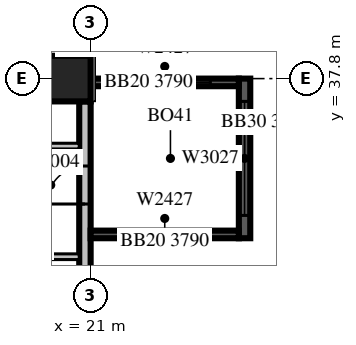
"""IFC4 building model, lengths in metres.
Left out: names, types, materials, properties, quantities, classifications, styles, units other than length and angle.
Written with IfcOpenShell. Run it as: python <this file> out.ifc"""

import sys

from ifc_helpers import new_model, si_unit, direction, frame, frame_2d, origin, origin_2d, place, context, subcontext, project, spatial, rectangle, extrude, source, transform, mapped, element, fill, save


model = new_model("IFC4")
c1 = context("Model", 3, precision=1e-05, world=origin(), true_north=direction((0.0, 1.0)))
c2 = subcontext(c1, "Body", "Model", "MODEL_VIEW")
j1 = project(units=[si_unit("LENGTHUNIT", "METRE"), si_unit("PLANEANGLEUNIT", "RADIAN")], contexts=[c1])
p1 = place(None, origin())
s1 = spatial("IfcSite", under=j1, at=p1, CompositionType="ELEMENT")
p2 = place(p1, origin())
s2 = spatial("IfcBuilding", under=s1, at=p2, CompositionType="ELEMENT")
p3 = place(p2, frame((0.0, 0.0, 65.7)))
s3 = spatial("IfcBuildingStorey", under=s2, at=p3, CompositionType="ELEMENT", Elevation=65.7)
m1 = source(origin(), c2, "Body", "SweptSolid", [
    extrude(rectangle(XDim=1.2, YDim=1.2, at=origin_2d()), origin(), (0.0, 0.0, 1.0), 4.2),
])
p4 = place(p3, frame((20.4, 37.8, 0.0), z_axis=(0.0, 0.0, 1.0), x_axis=(1.0, 0.0, 0.0)))
e1 = element("IfcColumn", 1, at=p4, inside=s3, PredefinedType="COLUMN", context=c2, shape_type="MappedRepresentation", body=[
    mapped(m1, transform((0.0, 0.0, 0.0), scale=1.0)),
])
m2 = source(origin(), c2, "Body", "SweptSolid", [
    extrude(rectangle(XDim=7.2, YDim=0.3, at=frame_2d((3.6, 0.0))), origin(), (0.0, 0.0, 1.0), 3.8),
])
p5 = place(p3, frame((20.85, 30.0, 0.0), z_axis=(0.0, 0.0, 1.0), x_axis=(0.0, 1.0, 0.0)))
e2 = element("IfcWall", 2, at=p5, inside=s3, PredefinedType="STANDARD", context=c2, shape_type="MappedRepresentation", body=[
    mapped(m2, transform((0.0, 0.0, 0.0), scale=1.0)),
])
m3 = source(origin(), c2, "Body", "SweptSolid", [
    extrude(rectangle(XDim=2.4, YDim=2.7, at=frame_2d((1.2, 1.35))), frame((0.0, 0.16, 0.0), z_axis=(0.0, -1.0, 0.0), x_axis=(1.0, 0.0, 0.0)), (0.0, 0.0, 1.0), 0.32),
])
p6 = place(p5, frame((0.3, 0.0, 0.6)))
e3 = element("IfcOpeningElement", 3, at=p6, cuts=e2, PredefinedType="OPENING", context=c2, shape_type="MappedRepresentation", body=[
    mapped(m3, transform((0.0, 0.0, 0.0), scale=1.0)),
])
m4 = source(origin(), c2, "Body", "SweptSolid", [
    extrude(rectangle(XDim=1.0, YDim=2.1, at=frame_2d((0.5, 1.05))), frame((0.0, 0.16, 0.0), z_axis=(0.0, -1.0, 0.0), x_axis=(1.0, 0.0, 0.0)), (0.0, 0.0, 1.0), 0.32),
])
p7 = place(p5, frame((4.5, 0.0, 0.0)))
e4 = element("IfcOpeningElement", 4, at=p7, cuts=e2, PredefinedType="OPENING", context=c2, shape_type="MappedRepresentation", body=[
    mapped(m4, transform((0.0, 0.0, 0.0), scale=1.0)),
])
p8 = place(p3, frame((20.85, 38.4, 0.0), z_axis=(0.0, 0.0, 1.0), x_axis=(0.0, 1.0, 0.0)))
e5 = element("IfcWall", 5, at=p8, inside=s3, PredefinedType="STANDARD", context=c2, shape_type="MappedRepresentation", body=[
    mapped(m2, transform((0.0, 0.0, 0.0), scale=1.0)),
])
p9 = place(p8, frame((0.3, 0.0, 0.6)))
e6 = element("IfcOpeningElement", 6, at=p9, cuts=e5, PredefinedType="OPENING", context=c2, shape_type="MappedRepresentation", body=[
    mapped(m3, transform((0.0, 0.0, 0.0), scale=1.0)),
])
p10 = place(p8, frame((4.5, 0.0, 0.6)))
e7 = element("IfcOpeningElement", 7, at=p10, cuts=e5, PredefinedType="OPENING", context=c2, shape_type="MappedRepresentation", body=[
    mapped(m3, transform((0.0, 0.0, 0.0), scale=1.0)),
])
m5 = source(origin(), c2, "Body", "SweptSolid", [
    extrude(rectangle(XDim=4.2, YDim=0.3, at=frame_2d((2.1, 0.0))), origin(), (0.0, 0.0, 1.0), 3.79),
])
p11 = place(p3, frame((25.05, 33.6, 0.0), z_axis=(0.0, 0.0, 1.0), x_axis=(0.0, 1.0, 0.0)))
e8 = element("IfcWall", 8, at=p11, inside=s3, PredefinedType="SOLIDWALL", context=c2, shape_type="MappedRepresentation", body=[
    mapped(m5, transform((0.0, 0.0, 0.0), scale=1.0)),
])
m6 = source(origin(), c2, "Body", "SweptSolid", [
    extrude(rectangle(XDim=3.0, YDim=2.7, at=frame_2d((1.5, 1.35))), frame((0.0, 0.16, 0.0), z_axis=(0.0, -1.0, 0.0), x_axis=(1.0, 0.0, 0.0)), (0.0, 0.0, 1.0), 0.32),
])
p12 = place(p11, frame((0.6, 0.0, 0.6)))
e9 = element("IfcOpeningElement", 9, at=p12, cuts=e8, PredefinedType="OPENING", context=c2, shape_type="MappedRepresentation", body=[
    mapped(m6, transform((0.0, 0.0, 0.0), scale=1.0)),
])
m7 = source(origin(), c2, "Body", "SweptSolid", [
    extrude(rectangle(XDim=3.9, YDim=0.2, at=frame_2d((1.95, 0.0))), origin(), (0.0, 0.0, 1.0), 3.79),
])
p13 = place(p3, frame((21.0, 33.7, 0.0), z_axis=(0.0, 0.0, 1.0), x_axis=(1.0, 0.0, 0.0)))
e10 = element("IfcWall", 10, at=p13, inside=s3, PredefinedType="SOLIDWALL", context=c2, shape_type="MappedRepresentation", body=[
    mapped(m7, transform((0.0, 0.0, 0.0), scale=1.0)),
])
m8 = source(origin(), c2, "Body", "SweptSolid", [
    extrude(rectangle(XDim=2.4, YDim=2.7, at=frame_2d((1.2, 1.35))), frame((0.0, 0.11, 0.0), z_axis=(0.0, -1.0, 0.0), x_axis=(1.0, 0.0, 0.0)), (0.0, 0.0, 1.0), 0.22),
])
p14 = place(p13, frame((0.75, 0.0, 0.6)))
e11 = element("IfcOpeningElement", 11, at=p14, cuts=e10, PredefinedType="OPENING", context=c2, shape_type="MappedRepresentation", body=[
    mapped(m8, transform((0.0, 0.0, 0.0), scale=1.0)),
])
p15 = place(p3, frame((21.0, 37.7, 0.0), z_axis=(0.0, 0.0, 1.0), x_axis=(1.0, 0.0, 0.0)))
e12 = element("IfcWall", 12, at=p15, inside=s3, PredefinedType="SOLIDWALL", context=c2, shape_type="MappedRepresentation", body=[
    mapped(m7, transform((0.0, 0.0, 0.0), scale=1.0)),
])
p16 = place(p15, frame((0.75, 0.0, 0.6)))
e13 = element("IfcOpeningElement", 13, at=p16, cuts=e12, PredefinedType="OPENING", context=c2, shape_type="MappedRepresentation", body=[
    mapped(m8, transform((0.0, 0.0, 0.0), scale=1.0)),
])
m9 = source(origin(), c2, "Body", "SweptSolid", [
    extrude(rectangle(XDim=3.6, YDim=0.15, at=frame_2d((1.8, 0.0))), origin(), (0.0, 0.0, 1.0), 3.8),
])
for number, where, z_axis, x_axis in (
    (14, (17.1, 33.113, 0.0), (0.0, 0.0, 1.0), (1.0, 0.0, 0.0)),
    (15, (17.1, 36.024, 0.0), (0.0, 0.0, 1.0), (1.0, 0.0, 0.0)),
):
    element("IfcWall", number, at=place(p3, frame(where, z_axis=z_axis, x_axis=x_axis)), inside=s3, PredefinedType="PARTITIONING", context=c2, shape_type="MappedRepresentation", body=[
        mapped(m9, transform((0.0, 0.0, 0.0), scale=1.0)),
    ])
m10 = source(origin(), c2, "Body", "SweptSolid", [
    extrude(rectangle(XDim=3.0, YDim=2.7, at=frame_2d((1.5, 1.35))), frame((0.0, 0.03, 0.0), z_axis=(0.0, -1.0, 0.0), x_axis=(1.0, 0.0, 0.0)), (0.0, 0.0, 1.0), 0.06),
])
p17 = place(p12, origin())
e16 = element("IfcWindow", 16, at=p17, inside=s3, PartitioningType="SINGLE_PANEL", PredefinedType="WINDOW", context=c2, shape_type="MappedRepresentation", body=[
    mapped(m10, transform((0.0, 0.0, 0.0), scale=1.0)),
])
fill(e9, e16)
m11 = source(origin(), c2, "Body", "SweptSolid", [
    extrude(rectangle(XDim=2.4, YDim=2.7, at=frame_2d((1.2, 1.35))), frame((0.0, 0.03, 0.0), z_axis=(0.0, -1.0, 0.0), x_axis=(1.0, 0.0, 0.0)), (0.0, 0.0, 1.0), 0.06),
])
p18 = place(p14, origin())
e17 = element("IfcWindow", 17, at=p18, inside=s3, PartitioningType="SINGLE_PANEL", PredefinedType="WINDOW", context=c2, shape_type="MappedRepresentation", body=[
    mapped(m11, transform((0.0, 0.0, 0.0), scale=1.0)),
])
fill(e11, e17)
p19 = place(p16, origin())
e18 = element("IfcWindow", 18, at=p19, inside=s3, PartitioningType="SINGLE_PANEL", PredefinedType="WINDOW", context=c2, shape_type="MappedRepresentation", body=[
    mapped(m11, transform((0.0, 0.0, 0.0), scale=1.0)),
])
fill(e13, e18)
m12 = source(origin(), c2, "Body", "SweptSolid", [
    extrude(rectangle(XDim=1.0, YDim=2.1, at=frame_2d((0.5, 1.05))), frame((0.0, 0.025, 0.0), z_axis=(0.0, -1.0, 0.0), x_axis=(1.0, 0.0, 0.0)), (0.0, 0.0, 1.0), 0.05),
])
p20 = place(p7, origin())
e19 = element("IfcDoor", 19, at=p20, inside=s3, OperationType="SINGLE_SWING_LEFT", PredefinedType="DOOR", context=c2, shape_type="MappedRepresentation", body=[
    mapped(m12, transform((0.0, 0.0, 0.0), scale=1.0)),
])
fill(e4, e19)
save(model, sys.argv[1])
